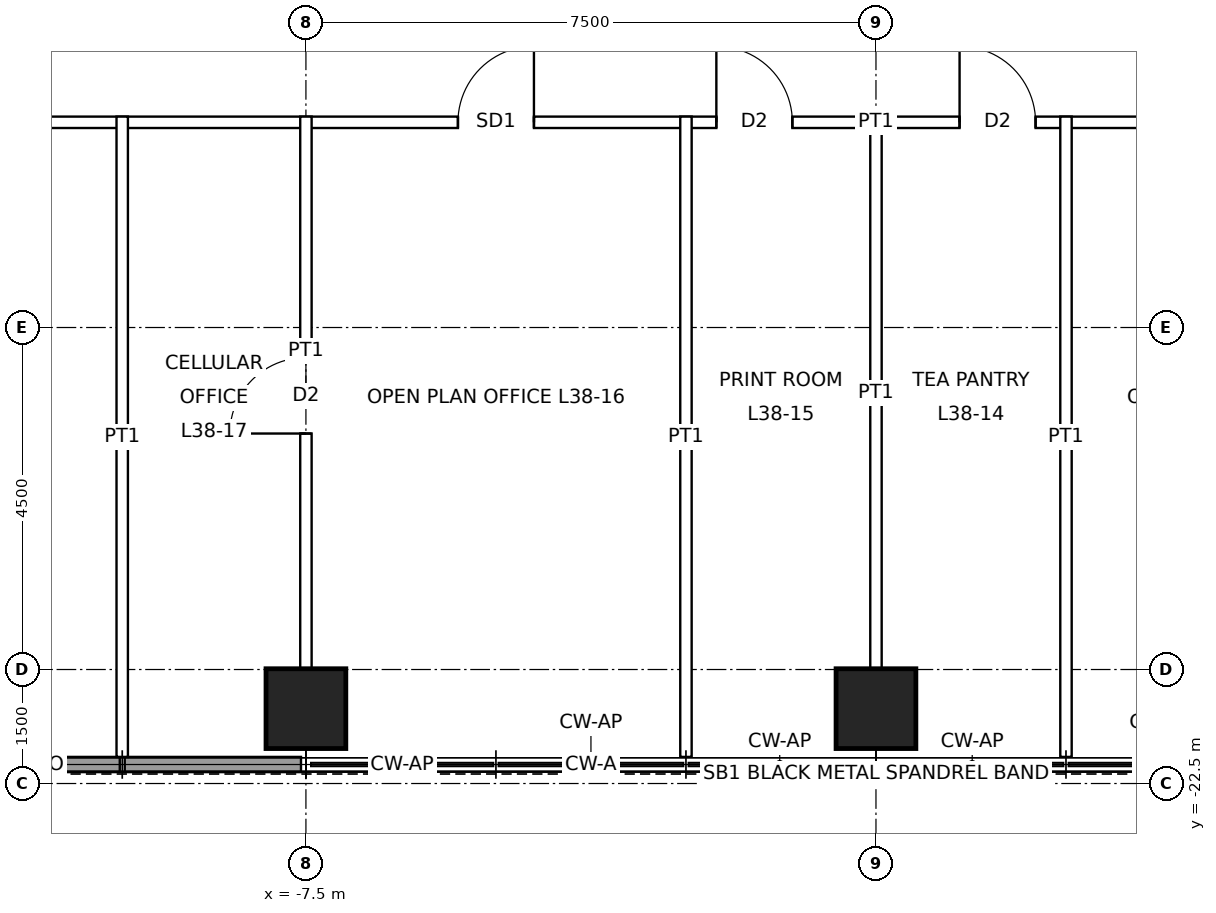
"""IFC4 building model, lengths in metres.
Left out: names, types, materials, properties, quantities, classifications, styles, units other than length and angle.
Written with IfcOpenShell. Run it as: python <this file> out.ifc"""

import sys

from ifc_helpers import new_model, si_unit, direction, frame, frame_2d, origin, origin_2d, place, context, subcontext, project, spatial, rectangle, hollow_rectangle, extrude, element, fill, save


model = new_model("IFC4")
c1 = context("Model", 3, precision=1e-05, world=origin(), true_north=direction((0.0, 1.0)))
c2 = subcontext(c1, "Body", "Model", "MODEL_VIEW")
j1 = project(units=[si_unit("LENGTHUNIT", "METRE"), si_unit("PLANEANGLEUNIT", "RADIAN")], contexts=[c1])
p1 = place(None, origin())
s1 = spatial("IfcSite", under=j1, at=p1, CompositionType="ELEMENT")
p2 = place(p1, origin())
s2 = spatial("IfcBuilding", under=s1, at=p2, CompositionType="ELEMENT")
p3 = place(p2, frame((0.0, 0.0, 185.9)))
s3 = spatial("IfcBuildingStorey", under=s2, at=p3, CompositionType="ELEMENT", Elevation=185.9)
for number, where, z_axis, x_axis in (
    (1, (0.0, -21.515, 0.0), (0.0, 0.0, 1.0), (1.0, 0.0, 0.0)),
    (2, (-7.5, -21.515, 0.0), (0.0, 0.0, 1.0), (1.0, 0.0, 0.0)),
):
    element("IfcColumn", number, at=place(p3, frame(where, z_axis=z_axis, x_axis=x_axis)), inside=s3, PredefinedType="COLUMN", context=c2, shape_type="SweptSolid", body=[
        extrude(hollow_rectangle(XDim=1.05, YDim=1.05, WallThickness=0.07, at=origin_2d()), origin(), (0.0, 0.0, 1.0), 4.0),
    ])
p4 = place(p3, frame((-7.565, -22.25, 0.0), z_axis=(0.0, 0.0, 1.0), x_axis=(-1.0, 0.0, 0.0)))
e3 = element("IfcWall", 3, at=p4, inside=s3, PredefinedType="SOLIDWALL", context=c2, shape_type="SweptSolid", body=[
    extrude(rectangle(XDim=2.319, YDim=0.2, at=frame_2d((1.16, 0.0))), origin(), (0.0, 0.0, 1.0), 3.85),
])
p5 = place(p3, frame((-9.949, -22.25, 0.0), z_axis=(0.0, 0.0, 1.0), x_axis=(-1.0, 0.0, 0.0)))
e4 = element("IfcWall", 4, at=p5, inside=s3, PredefinedType="SOLIDWALL", context=c2, shape_type="SweptSolid", body=[
    extrude(rectangle(XDim=2.352, YDim=0.2, at=frame_2d((1.176, 0.0))), origin(), (0.0, 0.0, 1.0), 3.85),
])
p6 = place(p3, frame((-13.875, -13.8, 0.0), z_axis=(0.0, 0.0, 1.0), x_axis=(1.0, 0.0, 0.0)))
e5 = element("IfcWall", 5, at=p6, inside=s3, PredefinedType="PARTITIONING", context=c2, shape_type="SweptSolid", body=[
    extrude(rectangle(XDim=27.75, YDim=0.15, at=frame_2d((13.875, 0.0))), origin(), (0.0, 0.0, 1.0), 3.85),
])
p7 = place(p6, frame((18.375, 0.0, 0.0)))
e6 = element("IfcOpeningElement", 6, at=p7, cuts=e5, PredefinedType="OPENING", context=c2, shape_type="SweptSolid", body=[
    extrude(rectangle(XDim=1.0, YDim=2.4, at=frame_2d((0.5, 1.2))), frame((0.0, 0.085, 0.0), z_axis=(0.0, -1.0, 0.0), x_axis=(1.0, 0.0, 0.0)), (0.0, 0.0, 1.0), 0.17),
])
p8 = place(p6, frame((14.975, 0.0, 0.0)))
e7 = element("IfcOpeningElement", 7, at=p8, cuts=e5, PredefinedType="OPENING", context=c2, shape_type="SweptSolid", body=[
    extrude(rectangle(XDim=1.0, YDim=2.1, at=frame_2d((0.5, 1.05))), frame((0.0, 0.085, 0.0), z_axis=(0.0, -1.0, 0.0), x_axis=(1.0, 0.0, 0.0)), (0.0, 0.0, 1.0), 0.17),
])
p9 = place(p6, frame((11.775, 0.0, 0.0)))
e8 = element("IfcOpeningElement", 8, at=p9, cuts=e5, PredefinedType="OPENING", context=c2, shape_type="SweptSolid", body=[
    extrude(rectangle(XDim=1.0, YDim=2.1, at=frame_2d((0.5, 1.05))), frame((0.0, 0.085, 0.0), z_axis=(0.0, -1.0, 0.0), x_axis=(1.0, 0.0, 0.0)), (0.0, 0.0, 1.0), 0.17),
])
p10 = place(p6, frame((8.375, 0.0, 0.0)))
e9 = element("IfcOpeningElement", 9, at=p10, cuts=e5, PredefinedType="OPENING", context=c2, shape_type="SweptSolid", body=[
    extrude(rectangle(XDim=1.0, YDim=2.4, at=frame_2d((0.5, 1.2))), frame((0.0, 0.085, 0.0), z_axis=(0.0, -1.0, 0.0), x_axis=(1.0, 0.0, 0.0)), (0.0, 0.0, 1.0), 0.17),
])
p11 = place(p6, frame((25.65, 0.0, 0.0)))
e10 = element("IfcOpeningElement", 10, at=p11, cuts=e5, PredefinedType="OPENING", context=c2, shape_type="SweptSolid", body=[
    extrude(rectangle(XDim=1.0, YDim=2.4, at=frame_2d((0.5, 1.2))), frame((0.0, 0.085, 0.0), z_axis=(0.0, -1.0, 0.0), x_axis=(1.0, 0.0, 0.0)), (0.0, 0.0, 1.0), 0.17),
])
p12 = place(p6, frame((1.517, 0.0, 0.0)))
e11 = element("IfcOpeningElement", 11, at=p12, cuts=e5, PredefinedType="OPENING", context=c2, shape_type="SweptSolid", body=[
    extrude(rectangle(XDim=1.0, YDim=2.4, at=frame_2d((0.5, 1.2))), frame((0.0, 0.085, 0.0), z_axis=(0.0, -1.0, 0.0), x_axis=(1.0, 0.0, 0.0)), (0.0, 0.0, 1.0), 0.17),
])
p13 = place(p3, frame((-9.917, -22.15, 0.0), z_axis=(0.0, 0.0, 1.0), x_axis=(0.0, 1.0, 0.0)))
e12 = element("IfcWall", 12, at=p13, inside=s3, PredefinedType="PARTITIONING", context=c2, shape_type="SweptSolid", body=[
    extrude(rectangle(XDim=8.425, YDim=0.15, at=frame_2d((4.212, 0.0))), origin(), (0.0, 0.0, 1.0), 3.85),
])
p14 = place(p3, frame((-7.5, -20.99, 0.0), z_axis=(0.0, 0.0, 1.0), x_axis=(0.0, 1.0, 0.0)))
e13 = element("IfcWall", 13, at=p14, inside=s3, PredefinedType="PARTITIONING", context=c2, shape_type="SweptSolid", body=[
    extrude(rectangle(XDim=7.265, YDim=0.15, at=frame_2d((3.632, 0.0))), origin(), (0.0, 0.0, 1.0), 3.238),
])
p15 = place(p14, frame((3.095, 0.0, 0.0)))
e14 = element("IfcOpeningElement", 14, at=p15, cuts=e13, PredefinedType="OPENING", context=c2, shape_type="SweptSolid", body=[
    extrude(rectangle(XDim=1.0, YDim=2.1, at=frame_2d((0.5, 1.05))), frame((0.0, 0.085, 0.0), z_axis=(0.0, -1.0, 0.0), x_axis=(1.0, 0.0, 0.0)), (0.0, 0.0, 1.0), 0.17),
])
p16 = place(p3, frame((-2.5, -22.15, 0.0), z_axis=(0.0, 0.0, 1.0), x_axis=(0.0, 1.0, 0.0)))
e15 = element("IfcWall", 15, at=p16, inside=s3, PredefinedType="PARTITIONING", context=c2, shape_type="SweptSolid", body=[
    extrude(rectangle(XDim=8.425, YDim=0.15, at=frame_2d((4.212, 0.0))), origin(), (0.0, 0.0, 1.0), 3.85),
])
p17 = place(p3, frame((0.0, -20.99, 0.0), z_axis=(0.0, 0.0, 1.0), x_axis=(0.0, 1.0, 0.0)))
e16 = element("IfcWall", 16, at=p17, inside=s3, PredefinedType="PARTITIONING", context=c2, shape_type="SweptSolid", body=[
    extrude(rectangle(XDim=7.265, YDim=0.15, at=frame_2d((3.632, 0.0))), origin(), (0.0, 0.0, 1.0), 3.238),
])
p18 = place(p3, frame((2.5, -22.15, 0.0), z_axis=(0.0, 0.0, 1.0), x_axis=(0.0, 1.0, 0.0)))
e17 = element("IfcWall", 17, at=p18, inside=s3, PredefinedType="PARTITIONING", context=c2, shape_type="SweptSolid", body=[
    extrude(rectangle(XDim=8.425, YDim=0.15, at=frame_2d((4.212, 0.0))), origin(), (0.0, 0.0, 1.0), 3.85),
])
p19 = place(p8, origin())
e18 = element("IfcDoor", 18, at=p19, inside=s3, OperationType="SINGLE_SWING_LEFT", PredefinedType="DOOR", context=c2, shape_type="SweptSolid", body=[
    extrude(rectangle(XDim=1.0, YDim=2.1, at=frame_2d((0.5, 1.05))), frame((0.0, 0.025, 0.0), z_axis=(0.0, -1.0, 0.0), x_axis=(1.0, 0.0, 0.0)), (0.0, 0.0, 1.0), 0.05),
])
fill(e7, e18)
p20 = place(p9, origin())
e19 = element("IfcDoor", 19, at=p20, inside=s3, OperationType="SINGLE_SWING_LEFT", PredefinedType="DOOR", context=c2, shape_type="SweptSolid", body=[
    extrude(rectangle(XDim=1.0, YDim=2.1, at=frame_2d((0.5, 1.05))), frame((0.0, 0.025, 0.0), z_axis=(0.0, -1.0, 0.0), x_axis=(1.0, 0.0, 0.0)), (0.0, 0.0, 1.0), 0.05),
])
fill(e8, e19)
p21 = place(p10, origin())
e20 = element("IfcDoor", 20, at=p21, inside=s3, OperationType="SINGLE_SWING_RIGHT", PredefinedType="DOOR", context=c2, shape_type="SweptSolid", body=[
    extrude(rectangle(XDim=1.0, YDim=2.4, at=frame_2d((0.5, 1.2))), frame((0.0, 0.025, 0.0), z_axis=(0.0, -1.0, 0.0), x_axis=(1.0, 0.0, 0.0)), (0.0, 0.0, 1.0), 0.05),
])
fill(e9, e20)
p22 = place(p15, origin())
e21 = element("IfcDoor", 21, at=p22, inside=s3, OperationType="SINGLE_SWING_LEFT", PredefinedType="DOOR", context=c2, shape_type="SweptSolid", body=[
    extrude(rectangle(XDim=1.0, YDim=2.1, at=frame_2d((0.5, 1.05))), frame((0.0, 0.025, 0.0), z_axis=(0.0, -1.0, 0.0), x_axis=(1.0, 0.0, 0.0)), (0.0, 0.0, 1.0), 0.05),
])
fill(e14, e21)
save(model, sys.argv[1])
